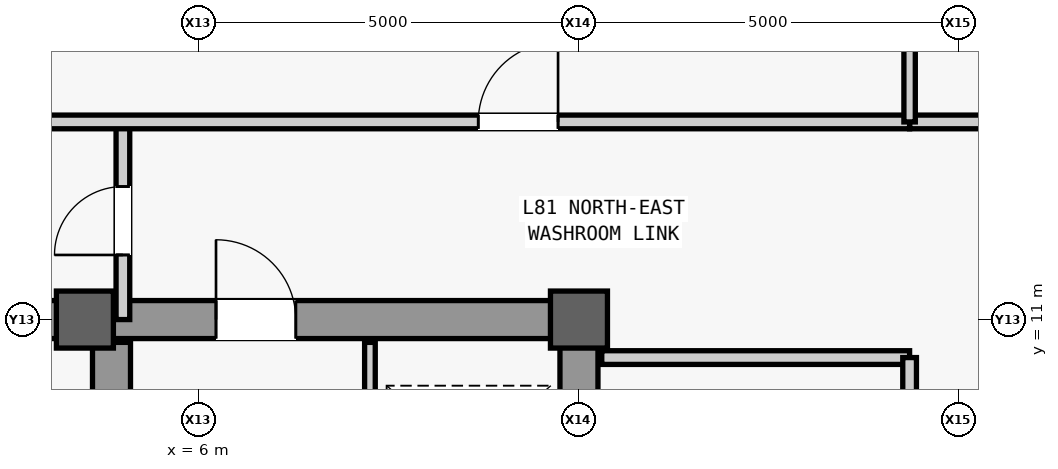
"""IFC4 building model, lengths in metres.
Left out: names, types, materials, properties, quantities, classifications, styles, units other than length and angle.
Written with IfcOpenShell. Run it as: python <this file> out.ifc"""

import sys

from ifc_helpers import new_model, si_unit, direction, frame, frame_2d, origin, origin_2d, place, context, subcontext, project, spatial, rectangle, extrude, source, transform, mapped, element, fill, save


model = new_model("IFC4")
c1 = context("Model", 3, precision=1e-05, world=origin(), true_north=direction((0.0, 1.0)))
c2 = subcontext(c1, "Body", "Model", "MODEL_VIEW")
j1 = project(units=[si_unit("LENGTHUNIT", "METRE"), si_unit("PLANEANGLEUNIT", "RADIAN")], contexts=[c1])
p1 = place(None, origin())
s1 = spatial("IfcSite", under=j1, at=p1, CompositionType="ELEMENT")
p2 = place(p1, origin())
s2 = spatial("IfcBuilding", under=s1, at=p2, CompositionType="ELEMENT")
p3 = place(p2, frame((0.0, 0.0, 342.3)))
s3 = spatial("IfcBuildingStorey", under=s2, at=p3, CompositionType="ELEMENT", Elevation=342.3)
m1 = source(origin(), c2, "Body", "SweptSolid", [
    extrude(rectangle(XDim=22.0, YDim=0.5, at=frame_2d((11.0, 0.0))), origin(), (0.0, 0.0, 1.0), 3.7),
])
p4 = place(p3, frame((11.0, -11.0, 0.0), z_axis=(0.0, 0.0, 1.0), x_axis=(0.0, 1.0, 0.0)))
e1 = element("IfcWall", 1, at=p4, inside=s3, PredefinedType="SHEAR", context=c2, shape_type="MappedRepresentation", body=[
    mapped(m1, transform((0.0, 0.0, 0.0), scale=1.0)),
])
m2 = source(origin(), c2, "Body", "SweptSolid", [
    extrude(rectangle(XDim=1.1, YDim=2.2, at=frame_2d((0.55, 1.1))), frame((0.0, 0.26, 0.0), z_axis=(0.0, -1.0, 0.0), x_axis=(1.0, 0.0, 0.0)), (0.0, 0.0, 1.0), 0.52),
])
p5 = place(p4, frame((0.8, 0.0, 0.0)))
e2 = element("IfcOpeningElement", 2, at=p5, cuts=e1, PredefinedType="OPENING", context=c2, shape_type="MappedRepresentation", body=[
    mapped(m2, transform((0.0, 0.0, 0.0), scale=1.0)),
])
m3 = source(origin(), c2, "Body", "SweptSolid", [
    extrude(rectangle(XDim=0.9, YDim=2.15, at=frame_2d((0.45, 1.075))), frame((0.0, 0.26, 0.0), z_axis=(0.0, -1.0, 0.0), x_axis=(1.0, 0.0, 0.0)), (0.0, 0.0, 1.0), 0.52),
])
p6 = place(p4, frame((6.85, 0.0, 0.0)))
e3 = element("IfcOpeningElement", 3, at=p6, cuts=e1, PredefinedType="OPENING", context=c2, shape_type="MappedRepresentation", body=[
    mapped(m3, transform((0.0, 0.0, 0.0), scale=1.0)),
])
m4 = source(origin(), c2, "Body", "SweptSolid", [
    extrude(rectangle(XDim=1.2, YDim=2.3, at=frame_2d((0.6, 1.15))), frame((0.0, 0.26, 0.0), z_axis=(0.0, -1.0, 0.0), x_axis=(1.0, 0.0, 0.0)), (0.0, 0.0, 1.0), 0.52),
])
p7 = place(p4, frame((17.6, 0.0, 0.0)))
e4 = element("IfcOpeningElement", 4, at=p7, cuts=e1, PredefinedType="OPENING", context=c2, shape_type="MappedRepresentation", body=[
    mapped(m4, transform((0.0, 0.0, 0.0), scale=1.0)),
])
p8 = place(p4, frame((19.6, 0.0, 0.0)))
e5 = element("IfcOpeningElement", 5, at=p8, cuts=e1, PredefinedType="OPENING", context=c2, shape_type="MappedRepresentation", body=[
    mapped(m4, transform((0.0, 0.0, 0.0), scale=1.0)),
])
m5 = source(origin(), c2, "Body", "SweptSolid", [
    extrude(rectangle(XDim=1.3, YDim=2.3, at=frame_2d((0.65, 1.15))), frame((0.0, 0.26, 0.0), z_axis=(0.0, -1.0, 0.0), x_axis=(1.0, 0.0, 0.0)), (0.0, 0.0, 1.0), 0.52),
])
p9 = place(p4, frame((2.7, 0.0, 0.0)))
e6 = element("IfcOpeningElement", 6, at=p9, cuts=e1, PredefinedType="OPENING", context=c2, shape_type="MappedRepresentation", body=[
    mapped(m5, transform((0.0, 0.0, 0.0), scale=1.0)),
])
p10 = place(p4, frame((13.35, 0.0, 0.0)))
e7 = element("IfcOpeningElement", 7, at=p10, cuts=e1, PredefinedType="OPENING", context=c2, shape_type="MappedRepresentation", body=[
    mapped(m5, transform((0.0, 0.0, 0.0), scale=1.0)),
])
m6 = source(origin(), c2, "Body", "SweptSolid", [
    extrude(rectangle(XDim=21.4, YDim=0.5, at=frame_2d((10.7, 0.0))), origin(), (0.0, 0.0, 1.0), 3.7),
])
p11 = place(p3, frame((4.85, -10.7, 0.0), z_axis=(0.0, 0.0, 1.0), x_axis=(0.0, 1.0, 0.0)))
e8 = element("IfcWall", 8, at=p11, inside=s3, PredefinedType="SHEAR", context=c2, shape_type="MappedRepresentation", body=[
    mapped(m6, transform((0.0, 0.0, 0.0), scale=1.0)),
])
m7 = source(origin(), c2, "Body", "SweptSolid", [
    extrude(rectangle(XDim=5.9, YDim=0.5, at=frame_2d((2.95, 0.0))), origin(), (0.0, 0.0, 1.0), 3.7),
])
p12 = place(p3, frame((4.85, 11.0, 0.0), z_axis=(0.0, 0.0, 1.0), x_axis=(1.0, 0.0, 0.0)))
e9 = element("IfcWall", 9, at=p12, inside=s3, PredefinedType="SHEAR", context=c2, shape_type="MappedRepresentation", body=[
    mapped(m7, transform((0.0, 0.0, 0.0), scale=1.0)),
])
m8 = source(origin(), c2, "Body", "SweptSolid", [
    extrude(rectangle(XDim=1.05, YDim=2.2, at=frame_2d((0.525, 1.1))), frame((0.0, 0.26, 0.0), z_axis=(0.0, -1.0, 0.0), x_axis=(1.0, 0.0, 0.0)), (0.0, 0.0, 1.0), 0.52),
])
p13 = place(p12, frame((1.375, 0.0, 0.0)))
e10 = element("IfcOpeningElement", 10, at=p13, cuts=e9, PredefinedType="OPENING", context=c2, shape_type="MappedRepresentation", body=[
    mapped(m8, transform((0.0, 0.0, 0.0), scale=1.0)),
])
m9 = source(origin(), c2, "Body", "SweptSolid", [
    extrude(rectangle(XDim=9.2, YDim=0.5, at=frame_2d((4.6, 0.0))), origin(), (0.0, 0.0, 1.0), 3.7),
])
p14 = place(p3, frame((-4.6, 11.0, 0.0), z_axis=(0.0, 0.0, 1.0), x_axis=(1.0, 0.0, 0.0)))
e11 = element("IfcWall", 11, at=p14, inside=s3, PredefinedType="SHEAR", context=c2, shape_type="MappedRepresentation", body=[
    mapped(m9, transform((0.0, 0.0, 0.0), scale=1.0)),
])
m10 = source(origin(), c2, "Body", "SweptSolid", [
    extrude(rectangle(XDim=0.75, YDim=0.75, at=origin_2d()), origin(), (0.0, 0.0, 1.0), 4.0),
])
for number, where, z_axis, x_axis in (
    (12, (4.5, 11.0, 0.0), (0.0, 0.0, 1.0), (1.0, 0.0, 0.0)),
    (13, (11.0, 11.0, 0.0), (0.0, 0.0, 1.0), (1.0, 0.0, 0.0)),
):
    element("IfcColumn", number, at=place(p3, frame(where, z_axis=z_axis, x_axis=x_axis)), inside=s3, PredefinedType="COLUMN", context=c2, shape_type="MappedRepresentation", body=[
        mapped(m10, transform((0.0, 0.0, 0.0), scale=1.0)),
    ])
m11 = source(origin(), c2, "Body", "SweptSolid", [
    extrude(rectangle(XDim=9.4, YDim=0.14, at=frame_2d((4.7, 0.0))), origin(), (0.0, 0.0, 1.0), 3.7),
])
p15 = place(p3, frame((8.25, 1.3, 0.0), z_axis=(0.0, 0.0, 1.0), x_axis=(0.0, 1.0, 0.0)))
e14 = element("IfcWall", 14, at=p15, inside=s3, PredefinedType="PARTITIONING", context=c2, shape_type="MappedRepresentation", body=[
    mapped(m11, transform((0.0, 0.0, 0.0), scale=1.0)),
])
m12 = source(origin(), c2, "Body", "SweptSolid", [
    extrude(rectangle(XDim=4.05, YDim=0.18, at=frame_2d((2.025, 0.0))), origin(), (0.0, 0.0, 1.0), 3.7),
])
p16 = place(p3, frame((11.3, 10.5, 0.0), z_axis=(0.0, 0.0, 1.0), x_axis=(1.0, 0.0, 0.0)))
e15 = element("IfcWall", 15, at=p16, inside=s3, PredefinedType="PARTITIONING", context=c2, shape_type="MappedRepresentation", body=[
    mapped(m12, transform((0.0, 0.0, 0.0), scale=1.0)),
])
m13 = source(origin(), c2, "Body", "SweptSolid", [
    extrude(rectangle(XDim=16.6, YDim=0.18, at=frame_2d((8.3, 0.0))), origin(), (0.0, 0.0, 1.0), 3.7),
])
p17 = place(p3, frame((15.35, -6.1, 0.0), z_axis=(0.0, 0.0, 1.0), x_axis=(0.0, 1.0, 0.0)))
e16 = element("IfcWall", 16, at=p17, inside=s3, PredefinedType="PARTITIONING", context=c2, shape_type="MappedRepresentation", body=[
    mapped(m13, transform((0.0, 0.0, 0.0), scale=1.0)),
])
m14 = source(origin(), c2, "Body", "SweptSolid", [
    extrude(rectangle(XDim=1.8, YDim=2.25, at=frame_2d((0.9, 1.125))), frame((0.0, 0.1, 0.0), z_axis=(0.0, -1.0, 0.0), x_axis=(1.0, 0.0, 0.0)), (0.0, 0.0, 1.0), 0.2),
])
p18 = place(p17, frame((2.7, 0.0, 0.0)))
e17 = element("IfcOpeningElement", 17, at=p18, cuts=e16, PredefinedType="OPENING", context=c2, shape_type="MappedRepresentation", body=[
    mapped(m14, transform((0.0, 0.0, 0.0), scale=1.0)),
])
p19 = place(p17, frame((13.0, 0.0, 0.0)))
e18 = element("IfcOpeningElement", 18, at=p19, cuts=e16, PredefinedType="OPENING", context=c2, shape_type="MappedRepresentation", body=[
    mapped(m14, transform((0.0, 0.0, 0.0), scale=1.0)),
])
m15 = source(origin(), c2, "Body", "SweptSolid", [
    extrude(rectangle(XDim=2.6, YDim=0.18, at=frame_2d((1.3, 0.0))), origin(), (0.0, 0.0, 1.0), 3.7),
])
p20 = place(p3, frame((5.0, 11.0, 0.0), z_axis=(0.0, 0.0, 1.0), x_axis=(0.0, 1.0, 0.0)))
e19 = element("IfcWall", 19, at=p20, inside=s3, PredefinedType="PARTITIONING", context=c2, shape_type="MappedRepresentation", body=[
    mapped(m15, transform((0.0, 0.0, 0.0), scale=1.0)),
])
m16 = source(origin(), c2, "Body", "SweptSolid", [
    extrude(rectangle(XDim=0.9, YDim=2.15, at=frame_2d((0.45, 1.075))), frame((0.0, 0.1, 0.0), z_axis=(0.0, -1.0, 0.0), x_axis=(1.0, 0.0, 0.0)), (0.0, 0.0, 1.0), 0.2),
])
p21 = place(p20, frame((0.85, 0.0, 0.0)))
e20 = element("IfcOpeningElement", 20, at=p21, cuts=e19, PredefinedType="OPENING", context=c2, shape_type="MappedRepresentation", body=[
    mapped(m16, transform((0.0, 0.0, 0.0), scale=1.0)),
])
m17 = source(origin(), c2, "Body", "SweptSolid", [
    extrude(rectangle(XDim=2.4, YDim=0.18, at=frame_2d((1.2, 0.0))), origin(), (0.0, 0.0, 1.0), 3.7),
])
p22 = place(p3, frame((15.35, 13.6, 0.0), z_axis=(0.0, 0.0, 1.0), x_axis=(1.0, 0.0, 0.0)))
e21 = element("IfcWall", 21, at=p22, inside=s3, PredefinedType="PARTITIONING", context=c2, shape_type="MappedRepresentation", body=[
    mapped(m17, transform((0.0, 0.0, 0.0), scale=1.0)),
])
m18 = source(origin(), c2, "Body", "SweptSolid", [
    extrude(rectangle(XDim=32.75, YDim=0.18, at=frame_2d((16.375, 0.0))), origin(), (0.0, 0.0, 1.0), 3.7),
])
p23 = place(p3, frame((-17.4, 13.6, 0.0), z_axis=(0.0, 0.0, 1.0), x_axis=(1.0, 0.0, 0.0)))
e22 = element("IfcWall", 22, at=p23, inside=s3, PredefinedType="PARTITIONING", context=c2, shape_type="MappedRepresentation", body=[
    mapped(m18, transform((0.0, 0.0, 0.0), scale=1.0)),
])
m19 = source(origin(), c2, "Body", "SweptSolid", [
    extrude(rectangle(XDim=1.05, YDim=2.2, at=frame_2d((0.525, 1.1))), frame((0.0, 0.1, 0.0), z_axis=(0.0, -1.0, 0.0), x_axis=(1.0, 0.0, 0.0)), (0.0, 0.0, 1.0), 0.2),
])
p24 = place(p23, frame((27.075, 0.0, 0.0)))
e23 = element("IfcOpeningElement", 23, at=p24, cuts=e22, PredefinedType="OPENING", context=c2, shape_type="MappedRepresentation", body=[
    mapped(m19, transform((0.0, 0.0, 0.0), scale=1.0)),
])
m20 = source(origin(), c2, "Body", "SweptSolid", [
    extrude(rectangle(XDim=12.4, YDim=0.15, at=frame_2d((6.2, 0.0))), origin(), (0.0, 0.0, 1.0), 3.7),
])
p25 = place(p3, frame((15.35, 13.6, 0.0), z_axis=(0.0, 0.0, 1.0), x_axis=(0.0, 1.0, 0.0)))
e24 = element("IfcWall", 24, at=p25, inside=s3, PredefinedType="PARTITIONING", context=c2, shape_type="MappedRepresentation", body=[
    mapped(m20, transform((0.0, 0.0, 0.0), scale=1.0)),
])
m21 = source(origin(), c2, "Body", "SweptSolid", [
    extrude(rectangle(XDim=1.05, YDim=2.2, at=frame_2d((0.525, 1.1))), frame((0.0, 0.025, 0.0), z_axis=(0.0, -1.0, 0.0), x_axis=(1.0, 0.0, 0.0)), (0.0, 0.0, 1.0), 0.05),
])
p26 = place(p13, origin())
e25 = element("IfcDoor", 25, at=p26, inside=s3, OperationType="SINGLE_SWING_LEFT", PredefinedType="DOOR", context=c2, shape_type="MappedRepresentation", body=[
    mapped(m21, transform((0.0, 0.0, 0.0), scale=1.0)),
])
fill(e10, e25)
m22 = source(origin(), c2, "Body", "SweptSolid", [
    extrude(rectangle(XDim=0.9, YDim=2.15, at=frame_2d((0.45, 1.075))), frame((0.0, 0.025, 0.0), z_axis=(0.0, -1.0, 0.0), x_axis=(1.0, 0.0, 0.0)), (0.0, 0.0, 1.0), 0.05),
])
p27 = place(p21, origin())
e26 = element("IfcDoor", 26, at=p27, inside=s3, OperationType="SINGLE_SWING_LEFT", PredefinedType="DOOR", context=c2, shape_type="MappedRepresentation", body=[
    mapped(m22, transform((0.0, 0.0, 0.0), scale=1.0)),
])
fill(e20, e26)
p28 = place(p24, origin())
e27 = element("IfcDoor", 27, at=p28, inside=s3, OperationType="SINGLE_SWING_RIGHT", PredefinedType="DOOR", context=c2, shape_type="MappedRepresentation", body=[
    mapped(m21, transform((0.0, 0.0, 0.0), scale=1.0)),
])
fill(e23, e27)
save(model, sys.argv[1])
